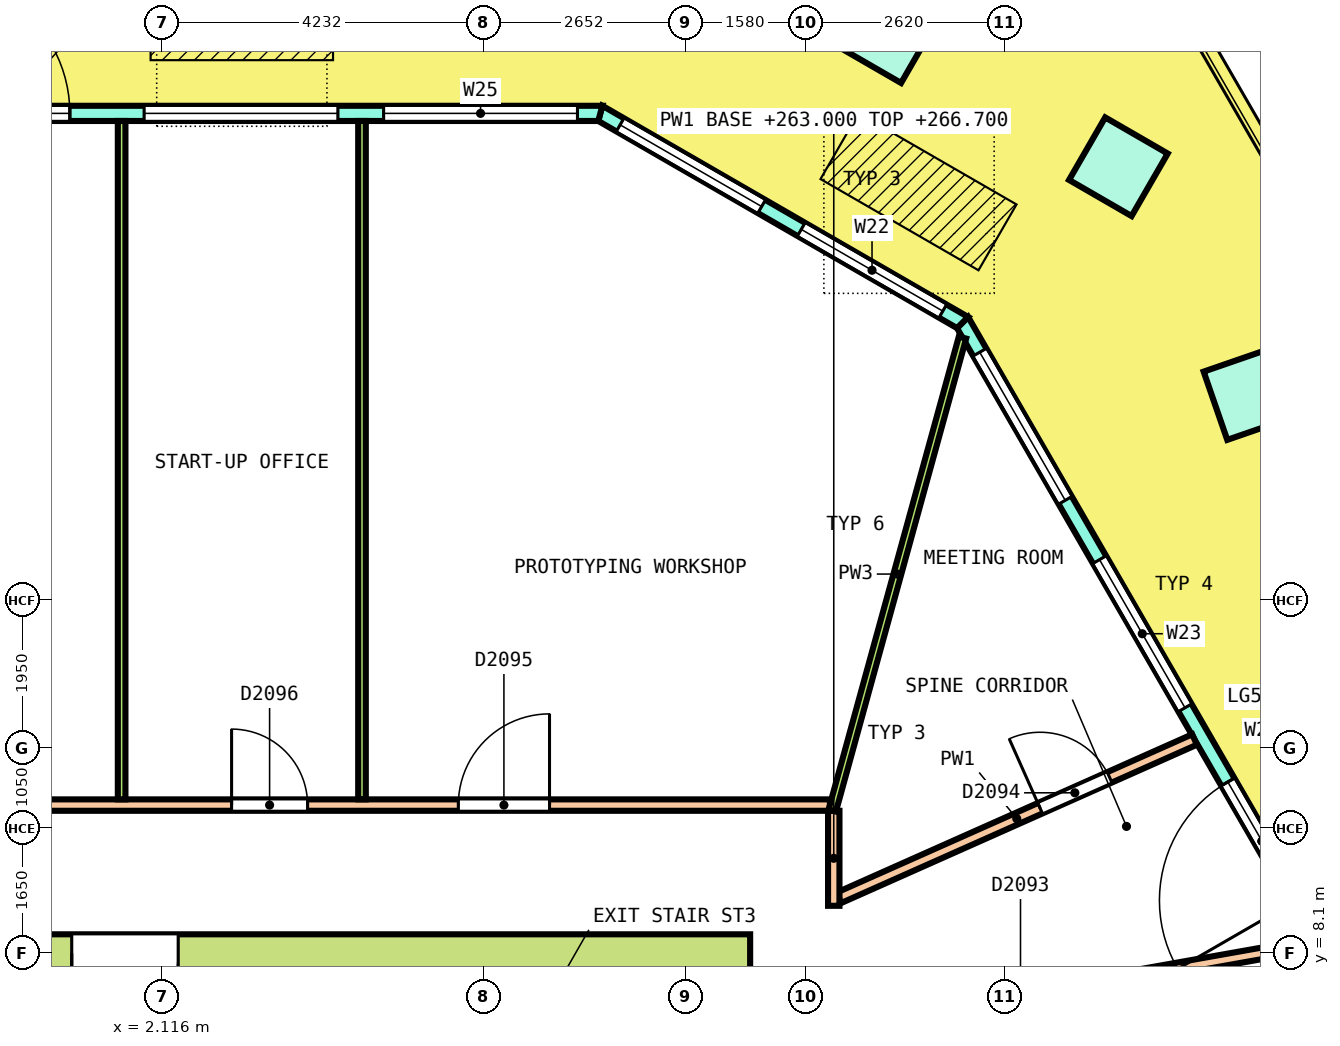
"""IFC4 building model, lengths in metres.
Left out: names, types, materials, properties, quantities, classifications, styles, units other than length and angle.
Written with IfcOpenShell. Run it as: python <this file> out.ifc"""

import sys

from ifc_helpers import new_model, si_unit, direction, frame, frame_2d, origin, origin_2d, place, context, subcontext, project, spatial, polyline, rectangle, outline, extrude, element, fill, save


model = new_model("IFC4")
c1 = context("Model", 3, precision=1e-05, world=origin(), true_north=direction((0.0, 1.0)))
c2 = subcontext(c1, "Body", "Model", "MODEL_VIEW")
j1 = project(units=[si_unit("LENGTHUNIT", "METRE"), si_unit("PLANEANGLEUNIT", "RADIAN")], contexts=[c1])
p1 = place(None, origin())
s1 = spatial("IfcSite", under=j1, at=p1, CompositionType="ELEMENT")
p2 = place(p1, origin())
s2 = spatial("IfcBuilding", under=s1, at=p2, CompositionType="ELEMENT")
p3 = place(p2, frame((0.0, 0.0, 263.0)))
s3 = spatial("IfcBuildingStorey", under=s2, at=p3, CompositionType="ELEMENT", Elevation=263.0)
p4 = place(p3, frame((16.42, 15.459, 0.0), z_axis=(0.032690901241, 0.006284140525, 0.999445753682), x_axis=(-0.49918988376, 0.866424307009, 0.010880265438)))
e1 = element("IfcColumn", 1, at=p4, inside=s3, PredefinedType="COLUMN", context=c2, shape_type="SweptSolid", body=[
    extrude(rectangle(XDim=0.95, YDim=0.95, at=origin_2d()), origin(), (0.0, 0.0, 1.0), 3.652),
])
for number, where, z_axis, x_axis in (
    (2, (14.695, 18.448, 0.0), (0.036, 0.0, 0.999), (-0.865, 0.5, 0.031)),
    (3, (11.662, 20.199, 0.0), (0.036, 0.0, 0.999), (-0.865, 0.5, 0.031)),
):
    element("IfcColumn", number, at=place(p3, frame(where, z_axis=z_axis, x_axis=x_axis)), inside=s3, PredefinedType="COLUMN", context=c2, shape_type="SweptSolid", body=[
        extrude(rectangle(XDim=0.95, YDim=0.95, at=origin_2d()), origin(), (0.0, 0.0, 1.0), 3.652),
    ])
p5 = place(p3, frame((20.524, 2.752, 0.0), z_axis=(0.0, 0.0, 1.0), x_axis=(-0.499993368965, 0.86602923218, 0.0)))
e4 = element("IfcWall", 4, at=p5, inside=s3, PredefinedType="SOLIDWALL", context=c2, shape_type="SweptSolid", body=[
    extrude(outline(polyline([(-0.027, -0.1), (1.027, -0.1), (2.081, -0.1), (3.135, -0.1), (4.189, -0.1), (5.244, -0.1), (6.298, -0.1), (7.352, -0.1), (8.406, -0.1), (9.46, -0.1), (10.514, -0.1), (11.568, -0.1), (12.622, -0.1), (13.676, -0.1), (14.73, -0.1), (15.784, -0.1), (15.731, 0.1), (14.684, 0.1), (13.637, 0.1), (12.59, 0.1), (11.543, 0.1), (10.496, 0.1), (9.449, 0.1), (8.402, 0.1), (7.355, 0.1), (6.308, 0.1), (5.261, 0.1), (4.215, 0.1), (3.168, 0.1), (2.121, 0.1), (1.074, 0.1), (0.027, 0.1), (-0.027, -0.1)])), origin(), (0.0, 0.0, 1.0), 3.7),
])
p6 = place(p5, frame((0.451, 0.0, 0.1)))
e5 = element("IfcOpeningElement", 5, at=p6, cuts=e4, PredefinedType="OPENING", context=c2, shape_type="SweptSolid", body=[
    extrude(rectangle(XDim=2.25, YDim=2.75, at=frame_2d((1.125, 1.375))), frame((0.0, 0.11, 0.0), z_axis=(0.0, -1.0, 0.0), x_axis=(1.0, 0.0, 0.0)), (0.0, 0.0, 1.0), 0.22),
])
p7 = place(p5, frame((3.602, 0.0, 0.1)))
e6 = element("IfcOpeningElement", 6, at=p7, cuts=e4, PredefinedType="OPENING", context=c2, shape_type="SweptSolid", body=[
    extrude(rectangle(XDim=2.25, YDim=2.75, at=frame_2d((1.125, 1.375))), frame((0.0, 0.11, 0.0), z_axis=(0.0, -1.0, 0.0), x_axis=(1.0, 0.0, 0.0)), (0.0, 0.0, 1.0), 0.22),
])
p8 = place(p5, frame((6.979, 0.0, 0.0)))
e7 = element("IfcOpeningElement", 7, at=p8, cuts=e4, PredefinedType="OPENING", context=c2, shape_type="SweptSolid", body=[
    extrude(rectangle(XDim=1.8, YDim=2.4, at=frame_2d((0.9, 1.2))), frame((0.0, 0.11, 0.0), z_axis=(0.0, -1.0, 0.0), x_axis=(1.0, 0.0, 0.0)), (0.0, 0.0, 1.0), 0.22),
])
p9 = place(p5, frame((6.979, 0.0, 2.55)))
e8 = element("IfcOpeningElement", 8, at=p9, cuts=e4, PredefinedType="OPENING", context=c2, shape_type="SweptSolid", body=[
    extrude(rectangle(XDim=1.8, YDim=0.3, at=frame_2d((0.9, 0.15))), frame((0.0, 0.11, 0.0), z_axis=(0.0, -1.0, 0.0), x_axis=(1.0, 0.0, 0.0)), (0.0, 0.0, 1.0), 0.22),
])
p10 = place(p5, frame((9.906, 0.0, 0.1)))
e9 = element("IfcOpeningElement", 9, at=p10, cuts=e4, PredefinedType="OPENING", context=c2, shape_type="SweptSolid", body=[
    extrude(rectangle(XDim=2.25, YDim=2.75, at=frame_2d((1.125, 1.375))), frame((0.0, 0.11, 0.0), z_axis=(0.0, -1.0, 0.0), x_axis=(1.0, 0.0, 0.0)), (0.0, 0.0, 1.0), 0.22),
])
p11 = place(p5, frame((13.057, 0.0, 0.1)))
e10 = element("IfcOpeningElement", 10, at=p11, cuts=e4, PredefinedType="OPENING", context=c2, shape_type="SweptSolid", body=[
    extrude(rectangle(XDim=2.25, YDim=2.75, at=frame_2d((1.125, 1.375))), frame((0.0, 0.11, 0.0), z_axis=(0.0, -1.0, 0.0), x_axis=(1.0, 0.0, 0.0)), (0.0, 0.0, 1.0), 0.22),
])
p12 = place(p3, frame((12.645, 16.398, 0.0), z_axis=(0.0, 0.0, 1.0), x_axis=(-0.866026017613, 0.499998936816, 0.0)))
e11 = element("IfcWall", 11, at=p12, inside=s3, PredefinedType="SOLIDWALL", context=c2, shape_type="SweptSolid", body=[
    extrude(outline(polyline([(-0.027, -0.1), (1.084, -0.1), (2.196, -0.1), (3.307, -0.1), (4.419, -0.1), (5.53, -0.1), (5.477, 0.1), (4.387, 0.1), (3.297, 0.1), (2.207, 0.1), (1.117, 0.1), (0.027, 0.1), (-0.027, -0.1)])), origin(), (0.0, 0.0, 1.0), 3.7),
])
p13 = place(p12, frame((0.301, 0.0, 0.1)))
e12 = element("IfcOpeningElement", 12, at=p13, cuts=e11, PredefinedType="OPENING", context=c2, shape_type="SweptSolid", body=[
    extrude(rectangle(XDim=2.15, YDim=2.75, at=frame_2d((1.075, 1.375))), frame((0.0, 0.11, 0.0), z_axis=(0.0, -1.0, 0.0), x_axis=(1.0, 0.0, 0.0)), (0.0, 0.0, 1.0), 0.22),
])
p14 = place(p12, frame((3.052, 0.0, 0.1)))
e13 = element("IfcOpeningElement", 13, at=p14, cuts=e11, PredefinedType="OPENING", context=c2, shape_type="SweptSolid", body=[
    extrude(rectangle(XDim=2.15, YDim=2.75, at=frame_2d((1.075, 1.375))), frame((0.0, 0.11, 0.0), z_axis=(0.0, -1.0, 0.0), x_axis=(1.0, 0.0, 0.0)), (0.0, 0.0, 1.0), 0.22),
])
p15 = place(p3, frame((7.879, 19.15, 0.0), z_axis=(0.0, 0.0, 1.0), x_axis=(-1.0, 0.0, 0.0)))
e14 = element("IfcWall", 14, at=p15, inside=s3, PredefinedType="SOLIDWALL", context=c2, shape_type="SweptSolid", body=[
    extrude(outline(polyline([(-0.027, -0.1), (1.027, -0.1), (2.081, -0.1), (3.135, -0.1), (4.189, -0.1), (5.244, -0.1), (6.298, -0.1), (7.352, -0.1), (8.406, -0.1), (9.46, -0.1), (10.514, -0.1), (11.568, -0.1), (12.622, -0.1), (13.677, -0.1), (14.73, -0.1), (15.785, -0.1), (15.731, 0.1), (14.684, 0.1), (13.637, 0.1), (12.59, 0.1), (11.543, 0.1), (10.496, 0.1), (9.449, 0.1), (8.402, 0.1), (7.355, 0.1), (6.309, 0.1), (5.261, 0.1), (4.215, 0.1), (3.168, 0.1), (2.121, 0.1), (1.074, 0.1), (0.027, 0.1), (-0.027, -0.1)])), origin(), (0.0, 0.0, 1.0), 3.7),
])
p16 = place(p15, frame((0.301, 0.0, 0.1)))
e15 = element("IfcOpeningElement", 15, at=p16, cuts=e14, PredefinedType="OPENING", context=c2, shape_type="SweptSolid", body=[
    extrude(rectangle(XDim=2.55, YDim=2.75, at=frame_2d((1.275, 1.375))), frame((0.0, 0.11, 0.0), z_axis=(0.0, -1.0, 0.0), x_axis=(1.0, 0.0, 0.0)), (0.0, 0.0, 1.0), 0.22),
])
p17 = place(p15, frame((3.452, 0.0, 0.1)))
e16 = element("IfcOpeningElement", 16, at=p17, cuts=e14, PredefinedType="OPENING", context=c2, shape_type="SweptSolid", body=[
    extrude(rectangle(XDim=2.55, YDim=2.75, at=frame_2d((1.275, 1.375))), frame((0.0, 0.11, 0.0), z_axis=(0.0, -1.0, 0.0), x_axis=(1.0, 0.0, 0.0)), (0.0, 0.0, 1.0), 0.22),
])
p18 = place(p15, frame((6.979, 0.0, 0.0)))
e17 = element("IfcOpeningElement", 17, at=p18, cuts=e14, PredefinedType="OPENING", context=c2, shape_type="SweptSolid", body=[
    extrude(rectangle(XDim=1.8, YDim=2.4, at=frame_2d((0.9, 1.2))), frame((0.0, 0.11, 0.0), z_axis=(0.0, -1.0, 0.0), x_axis=(1.0, 0.0, 0.0)), (0.0, 0.0, 1.0), 0.22),
])
p19 = place(p15, frame((6.979, 0.0, 2.55)))
e18 = element("IfcOpeningElement", 18, at=p19, cuts=e14, PredefinedType="OPENING", context=c2, shape_type="SweptSolid", body=[
    extrude(rectangle(XDim=1.8, YDim=0.3, at=frame_2d((0.9, 0.15))), frame((0.0, 0.11, 0.0), z_axis=(0.0, -1.0, 0.0), x_axis=(1.0, 0.0, 0.0)), (0.0, 0.0, 1.0), 0.22),
])
p20 = place(p15, frame((9.755, 0.0, 0.1)))
e19 = element("IfcOpeningElement", 19, at=p20, cuts=e14, PredefinedType="OPENING", context=c2, shape_type="SweptSolid", body=[
    extrude(rectangle(XDim=2.55, YDim=2.75, at=frame_2d((1.275, 1.375))), frame((0.0, 0.11, 0.0), z_axis=(0.0, -1.0, 0.0), x_axis=(1.0, 0.0, 0.0)), (0.0, 0.0, 1.0), 0.22),
])
p21 = place(p15, frame((12.907, 0.0, 0.1)))
e20 = element("IfcOpeningElement", 20, at=p21, cuts=e14, PredefinedType="OPENING", context=c2, shape_type="SweptSolid", body=[
    extrude(rectangle(XDim=2.55, YDim=2.75, at=frame_2d((1.275, 1.375))), frame((0.0, 0.11, 0.0), z_axis=(0.0, -1.0, 0.0), x_axis=(1.0, 0.0, 0.0)), (0.0, 0.0, 1.0), 0.22),
])
p22 = place(p3, frame((-9.85, 8.1, 0.0), z_axis=(0.0, 0.0, 1.0), x_axis=(1.0, 0.0, 0.0)))
e21 = element("IfcWall", 21, at=p22, inside=s3, PredefinedType="SHEAR", context=c2, shape_type="SweptSolid", body=[
    extrude(rectangle(XDim=19.7, YDim=0.5, at=frame_2d((9.85, 0.0))), origin(), (0.0, 0.0, 1.0), 3.7),
])
p23 = place(p22, frame((10.775, 0.0, 0.0)))
e22 = element("IfcOpeningElement", 22, at=p23, cuts=e21, PredefinedType="OPENING", context=c2, shape_type="SweptSolid", body=[
    extrude(rectangle(XDim=1.4, YDim=2.1, at=frame_2d((0.7, 1.05))), frame((0.0, 0.26, 0.0), z_axis=(0.0, -1.0, 0.0), x_axis=(1.0, 0.0, 0.0)), (0.0, 0.0, 1.0), 0.52),
])
p24 = place(p3, frame((11.024, 7.113, 0.0), z_axis=(0.0, 0.0, 1.0), x_axis=(0.984612128706, 0.174753987095, 0.0)))
e23 = element("IfcWall", 23, at=p24, inside=s3, PredefinedType="PARTITIONING", context=c2, shape_type="SweptSolid", body=[
    extrude(rectangle(XDim=6.326, YDim=0.15, at=frame_2d((3.163, 0.0))), origin(), (0.0, 0.0, 1.0), 2.9),
])
p25 = place(p24, frame((1.92, 0.0, 0.0)))
e24 = element("IfcOpeningElement", 24, at=p25, cuts=e23, PredefinedType="OPENING", context=c2, shape_type="SweptSolid", body=[
    extrude(rectangle(XDim=1.0, YDim=2.1, at=frame_2d((0.5, 1.05))), frame((0.0, 0.085, 0.0), z_axis=(0.0, -1.0, 0.0), x_axis=(1.0, 0.0, 0.0)), (0.0, 0.0, 1.0), 0.17),
])
p26 = place(p3, frame((11.019, 8.831, 0.0), z_axis=(0.0, 0.0, 1.0), x_axis=(0.913606957834, 0.406598483269, 0.0)))
e25 = element("IfcWall", 25, at=p26, inside=s3, PredefinedType="PARTITIONING", context=c2, shape_type="SweptSolid", body=[
    extrude(rectangle(XDim=5.121, YDim=0.15, at=frame_2d((2.56, 0.0))), origin(), (0.0, 0.0, 1.0), 2.9),
])
p27 = place(p26, frame((2.897, 0.0, 0.0)))
e26 = element("IfcOpeningElement", 26, at=p27, cuts=e25, PredefinedType="OPENING", context=c2, shape_type="SweptSolid", body=[
    extrude(rectangle(XDim=1.0, YDim=2.1, at=frame_2d((0.5, 1.05))), frame((0.0, 0.085, 0.0), z_axis=(0.0, -1.0, 0.0), x_axis=(1.0, 0.0, 0.0)), (0.0, 0.0, 1.0), 0.17),
])
p28 = place(p3, frame((10.95, 8.725, 0.0), z_axis=(0.0, 0.0, 1.0), x_axis=(0.0, 1.0, 0.0)))
e27 = element("IfcWall", 27, at=p28, inside=s3, PredefinedType="PARTITIONING", context=c2, shape_type="SweptSolid", body=[
    extrude(rectangle(XDim=1.25, YDim=0.15, at=frame_2d((0.625, 0.0))), origin(), (0.0, 0.0, 1.0), 3.7),
])
p29 = place(p3, frame((-10.875, 10.05, 0.0), z_axis=(0.0, 0.0, 1.0), x_axis=(1.0, 0.0, 0.0)))
e28 = element("IfcWall", 28, at=p29, inside=s3, PredefinedType="PARTITIONING", context=c2, shape_type="SweptSolid", body=[
    extrude(rectangle(XDim=21.775, YDim=0.15, at=frame_2d((10.887, 0.0))), origin(), (0.0, 0.0, 1.0), 2.9),
])
p30 = place(p29, frame((16.885, 0.0, 0.0)))
e29 = element("IfcOpeningElement", 29, at=p30, cuts=e28, PredefinedType="OPENING", context=c2, shape_type="SweptSolid", body=[
    extrude(rectangle(XDim=1.2, YDim=2.1, at=frame_2d((0.6, 1.05))), frame((0.0, 0.085, 0.0), z_axis=(0.0, -1.0, 0.0), x_axis=(1.0, 0.0, 0.0)), (0.0, 0.0, 1.0), 0.17),
])
p31 = place(p29, frame((13.903, 0.0, 0.0)))
e30 = element("IfcOpeningElement", 30, at=p31, cuts=e28, PredefinedType="OPENING", context=c2, shape_type="SweptSolid", body=[
    extrude(rectangle(XDim=1.0, YDim=2.1, at=frame_2d((0.5, 1.05))), frame((0.0, 0.085, 0.0), z_axis=(0.0, -1.0, 0.0), x_axis=(1.0, 0.0, 0.0)), (0.0, 0.0, 1.0), 0.17),
])
p32 = place(p29, frame((7.638, 0.0, 0.0)))
e31 = element("IfcOpeningElement", 31, at=p32, cuts=e28, PredefinedType="OPENING", context=c2, shape_type="SweptSolid", body=[
    extrude(rectangle(XDim=1.0, YDim=2.1, at=frame_2d((0.5, 1.05))), frame((0.0, 0.085, 0.0), z_axis=(0.0, -1.0, 0.0), x_axis=(1.0, 0.0, 0.0)), (0.0, 0.0, 1.0), 0.17),
])
p33 = place(p29, frame((4.416, 0.0, 0.0)))
e32 = element("IfcOpeningElement", 32, at=p33, cuts=e28, PredefinedType="OPENING", context=c2, shape_type="SweptSolid", body=[
    extrude(rectangle(XDim=1.0, YDim=2.1, at=frame_2d((0.5, 1.05))), frame((0.0, 0.085, 0.0), z_axis=(0.0, -1.0, 0.0), x_axis=(1.0, 0.0, 0.0)), (0.0, 0.0, 1.0), 0.17),
])
p34 = place(p29, frame((1.372, 0.0, 0.0)))
e33 = element("IfcOpeningElement", 33, at=p34, cuts=e28, PredefinedType="OPENING", context=c2, shape_type="SweptSolid", body=[
    extrude(rectangle(XDim=1.0, YDim=2.1, at=frame_2d((0.5, 1.05))), frame((0.0, 0.085, 0.0), z_axis=(0.0, -1.0, 0.0), x_axis=(1.0, 0.0, 0.0)), (0.0, 0.0, 1.0), 0.17),
])
p35 = place(p3, frame((10.93, 9.978, 0.0), z_axis=(0.0, 0.0, 1.0), x_axis=(0.265456257417, 0.964122904716, 0.0)))
e34 = element("IfcWall", 34, at=p35, inside=s3, PredefinedType="PARTITIONING", context=c2, shape_type="SweptSolid", body=[
    extrude(rectangle(XDim=6.455, YDim=0.1, at=frame_2d((3.227, 0.0))), origin(), (0.0, 0.0, 1.0), 2.9),
])
for number, where, z_axis, x_axis in (
    (35, (4.743, 10.125, 0.0), (0.0, 0.0, 1.0), (0.0, 1.0, 0.0)),
    (36, (1.581, 10.125, 0.0), (0.0, 0.0, 1.0), (0.0, 1.0, 0.0)),
):
    element("IfcWall", number, at=place(p3, frame(where, z_axis=z_axis, x_axis=x_axis)), inside=s3, PredefinedType="PARTITIONING", context=c2, shape_type="SweptSolid", body=[
        extrude(rectangle(XDim=8.925, YDim=0.1, at=frame_2d((4.462, 0.0))), origin(), (0.0, 0.0, 1.0), 2.9),
    ])
p36 = place(p8, origin())
e37 = element("IfcDoor", 37, at=p36, inside=s3, OperationType="DOUBLE_DOOR_SINGLE_SWING", PredefinedType="DOOR", context=c2, shape_type="SweptSolid", body=[
    extrude(rectangle(XDim=1.8, YDim=2.4, at=frame_2d((0.9, 1.2))), frame((0.0, 0.025, 0.0), z_axis=(0.0, -1.0, 0.0), x_axis=(1.0, 0.0, 0.0)), (0.0, 0.0, 1.0), 0.05),
])
fill(e7, e37)
p37 = place(p9, origin())
e38 = element("IfcWindow", 38, at=p37, inside=s3, PartitioningType="SINGLE_PANEL", PredefinedType="WINDOW", context=c2, shape_type="SweptSolid", body=[
    extrude(rectangle(XDim=1.8, YDim=0.3, at=frame_2d((0.9, 0.15))), frame((0.0, 0.03, 0.0), z_axis=(0.0, -1.0, 0.0), x_axis=(1.0, 0.0, 0.0)), (0.0, 0.0, 1.0), 0.06),
])
fill(e8, e38)
p38 = place(p10, origin())
e39 = element("IfcWindow", 39, at=p38, inside=s3, PartitioningType="SINGLE_PANEL", PredefinedType="WINDOW", context=c2, shape_type="SweptSolid", body=[
    extrude(rectangle(XDim=2.25, YDim=2.75, at=frame_2d((1.125, 1.375))), frame((0.0, 0.03, 0.0), z_axis=(0.0, -1.0, 0.0), x_axis=(1.0, 0.0, 0.0)), (0.0, 0.0, 1.0), 0.06),
])
fill(e9, e39)
p39 = place(p11, origin())
e40 = element("IfcWindow", 40, at=p39, inside=s3, PartitioningType="SINGLE_PANEL", PredefinedType="WINDOW", context=c2, shape_type="SweptSolid", body=[
    extrude(rectangle(XDim=2.25, YDim=2.75, at=frame_2d((1.125, 1.375))), frame((0.0, 0.03, 0.0), z_axis=(0.0, -1.0, 0.0), x_axis=(1.0, 0.0, 0.0)), (0.0, 0.0, 1.0), 0.06),
])
fill(e10, e40)
p40 = place(p13, origin())
e41 = element("IfcWindow", 41, at=p40, inside=s3, PartitioningType="SINGLE_PANEL", PredefinedType="WINDOW", context=c2, shape_type="SweptSolid", body=[
    extrude(rectangle(XDim=2.15, YDim=2.75, at=frame_2d((1.075, 1.375))), frame((0.0, 0.03, 0.0), z_axis=(0.0, -1.0, 0.0), x_axis=(1.0, 0.0, 0.0)), (0.0, 0.0, 1.0), 0.06),
])
fill(e12, e41)
p41 = place(p14, origin())
e42 = element("IfcWindow", 42, at=p41, inside=s3, PartitioningType="SINGLE_PANEL", PredefinedType="WINDOW", context=c2, shape_type="SweptSolid", body=[
    extrude(rectangle(XDim=2.15, YDim=2.75, at=frame_2d((1.075, 1.375))), frame((0.0, 0.03, 0.0), z_axis=(0.0, -1.0, 0.0), x_axis=(1.0, 0.0, 0.0)), (0.0, 0.0, 1.0), 0.06),
])
fill(e13, e42)
p42 = place(p16, origin())
e43 = element("IfcWindow", 43, at=p42, inside=s3, PartitioningType="SINGLE_PANEL", PredefinedType="WINDOW", context=c2, shape_type="SweptSolid", body=[
    extrude(rectangle(XDim=2.55, YDim=2.75, at=frame_2d((1.275, 1.375))), frame((0.0, 0.03, 0.0), z_axis=(0.0, -1.0, 0.0), x_axis=(1.0, 0.0, 0.0)), (0.0, 0.0, 1.0), 0.06),
])
fill(e15, e43)
p43 = place(p17, origin())
e44 = element("IfcWindow", 44, at=p43, inside=s3, PartitioningType="SINGLE_PANEL", PredefinedType="WINDOW", context=c2, shape_type="SweptSolid", body=[
    extrude(rectangle(XDim=2.55, YDim=2.75, at=frame_2d((1.275, 1.375))), frame((0.0, 0.03, 0.0), z_axis=(0.0, -1.0, 0.0), x_axis=(1.0, 0.0, 0.0)), (0.0, 0.0, 1.0), 0.06),
])
fill(e16, e44)
p44 = place(p18, origin())
e45 = element("IfcDoor", 45, at=p44, inside=s3, OperationType="DOUBLE_DOOR_SINGLE_SWING", PredefinedType="DOOR", context=c2, shape_type="SweptSolid", body=[
    extrude(rectangle(XDim=1.8, YDim=2.4, at=frame_2d((0.9, 1.2))), frame((0.0, 0.025, 0.0), z_axis=(0.0, -1.0, 0.0), x_axis=(1.0, 0.0, 0.0)), (0.0, 0.0, 1.0), 0.05),
])
fill(e17, e45)
p45 = place(p19, origin())
e46 = element("IfcWindow", 46, at=p45, inside=s3, PartitioningType="SINGLE_PANEL", PredefinedType="WINDOW", context=c2, shape_type="SweptSolid", body=[
    extrude(rectangle(XDim=1.8, YDim=0.3, at=frame_2d((0.9, 0.15))), frame((0.0, 0.03, 0.0), z_axis=(0.0, -1.0, 0.0), x_axis=(1.0, 0.0, 0.0)), (0.0, 0.0, 1.0), 0.06),
])
fill(e18, e46)
p46 = place(p23, origin())
e47 = element("IfcDoor", 47, at=p46, inside=s3, OperationType="DOUBLE_DOOR_SINGLE_SWING", PredefinedType="DOOR", context=c2, shape_type="SweptSolid", body=[
    extrude(rectangle(XDim=1.4, YDim=2.1, at=frame_2d((0.7, 1.05))), frame((0.0, 0.2, 0.0), z_axis=(0.0, -1.0, 0.0), x_axis=(1.0, 0.0, 0.0)), (0.0, 0.0, 1.0), 0.4),
])
fill(e22, e47)
p47 = place(p27, origin())
e48 = element("IfcDoor", 48, at=p47, inside=s3, OperationType="SINGLE_SWING_LEFT", PredefinedType="DOOR", context=c2, shape_type="SweptSolid", body=[
    extrude(rectangle(XDim=1.0, YDim=2.1, at=frame_2d((0.5, 1.05))), frame((0.0, 0.025, 0.0), z_axis=(0.0, -1.0, 0.0), x_axis=(1.0, 0.0, 0.0)), (0.0, 0.0, 1.0), 0.05),
])
fill(e26, e48)
p48 = place(p30, origin())
e49 = element("IfcDoor", 49, at=p48, inside=s3, OperationType="DOUBLE_DOOR_SINGLE_SWING", PredefinedType="DOOR", context=c2, shape_type="SweptSolid", body=[
    extrude(rectangle(XDim=1.2, YDim=2.1, at=frame_2d((0.6, 1.05))), frame((0.0, 0.025, 0.0), z_axis=(0.0, -1.0, 0.0), x_axis=(1.0, 0.0, 0.0)), (0.0, 0.0, 1.0), 0.05),
])
fill(e29, e49)
p49 = place(p31, origin())
e50 = element("IfcDoor", 50, at=p49, inside=s3, OperationType="SINGLE_SWING_LEFT", PredefinedType="DOOR", context=c2, shape_type="SweptSolid", body=[
    extrude(rectangle(XDim=1.0, YDim=2.1, at=frame_2d((0.5, 1.05))), frame((0.0, 0.025, 0.0), z_axis=(0.0, -1.0, 0.0), x_axis=(1.0, 0.0, 0.0)), (0.0, 0.0, 1.0), 0.05),
])
fill(e30, e50)
save(model, sys.argv[1])
